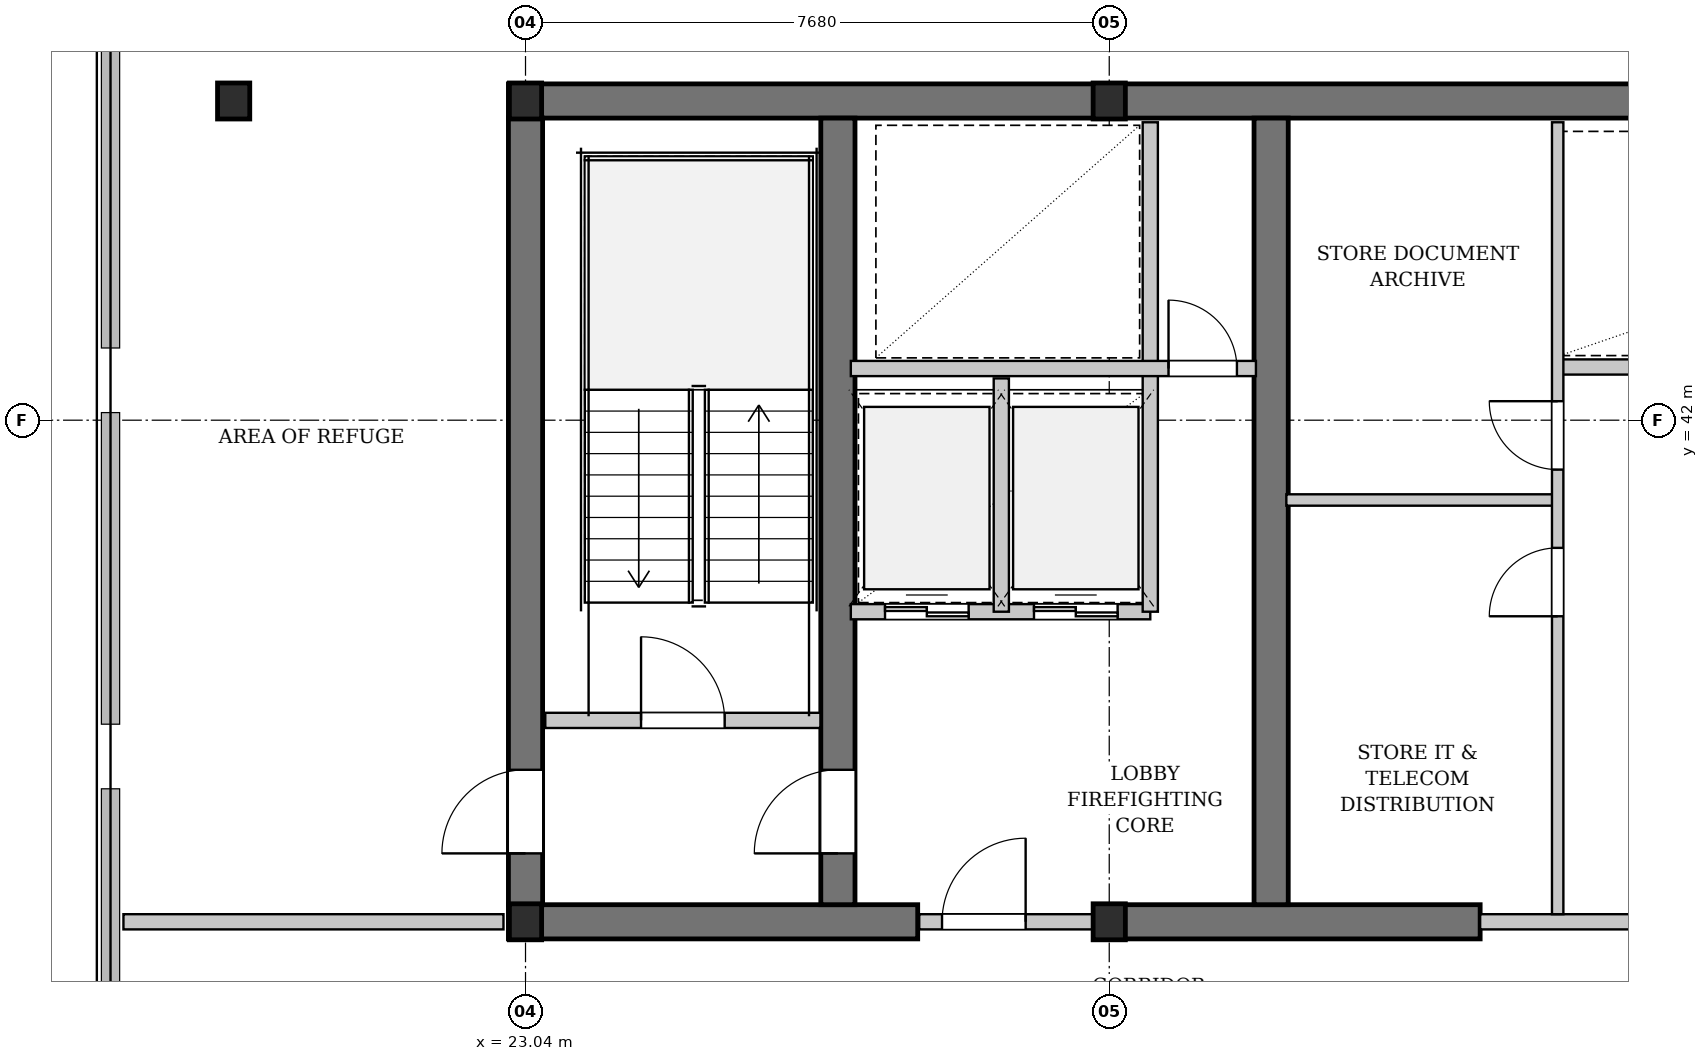
"""IFC4 building model, lengths in metres.
Left out: names, types, materials, properties, quantities, classifications, styles, units other than length and angle.
Written with IfcOpenShell. Run it as: python <this file> out.ifc"""

import sys

from ifc_helpers import new_model, si_unit, direction, frame, frame_2d, origin, origin_2d, place, context, subcontext, project, spatial, rectangle, i_section, extrude, element, fill, save


model = new_model("IFC4")
c1 = context("Model", 3, precision=1e-05, world=origin(), true_north=direction((0.0, 1.0)))
c2 = subcontext(c1, "Body", "Model", "MODEL_VIEW")
j1 = project(units=[si_unit("LENGTHUNIT", "METRE"), si_unit("PLANEANGLEUNIT", "RADIAN")], contexts=[c1])
p1 = place(None, origin())
s1 = spatial("IfcSite", under=j1, at=p1, CompositionType="ELEMENT")
p2 = place(p1, origin())
s2 = spatial("IfcBuilding", under=s1, at=p2, CompositionType="ELEMENT")
p3 = place(p2, frame((0.0, 0.0, 137.3)))
s3 = spatial("IfcBuildingStorey", under=s2, at=p3, CompositionType="ELEMENT", Elevation=137.3)
p4 = place(p3, frame((22.815, 46.2, 0.0), z_axis=(0.0, 0.0, 1.0), x_axis=(1.0, 0.0, 0.0)))
e1 = element("IfcWall", 1, at=p4, inside=s3, PredefinedType="SHEAR", context=c2, shape_type="SweptSolid", body=[
    extrude(rectangle(XDim=31.17, YDim=0.45, at=frame_2d((15.585, 0.0))), origin(), (0.0, 0.0, 1.0), 3.68),
])
p5 = place(p3, frame((22.815, 35.4, 0.0), z_axis=(0.0, 0.0, 1.0), x_axis=(1.0, 0.0, 0.0)))
e2 = element("IfcWall", 2, at=p5, inside=s3, PredefinedType="SHEAR", context=c2, shape_type="SweptSolid", body=[
    extrude(rectangle(XDim=5.385, YDim=0.45, at=frame_2d((2.692, 0.0))), origin(), (0.0, 0.0, 1.0), 3.68),
])
p6 = place(p3, frame((30.72, 35.4, 0.0), z_axis=(0.0, 0.0, 1.0), x_axis=(1.0, 0.0, 0.0)))
e3 = element("IfcWall", 3, at=p6, inside=s3, PredefinedType="SHEAR", context=c2, shape_type="SweptSolid", body=[
    extrude(rectangle(XDim=4.88, YDim=0.45, at=frame_2d((2.44, 0.0))), origin(), (0.0, 0.0, 1.0), 3.68),
])
p7 = place(p3, frame((23.04, 35.625, 0.0), z_axis=(0.0, 0.0, 1.0), x_axis=(0.0, 1.0, 0.0)))
e4 = element("IfcWall", 4, at=p7, inside=s3, PredefinedType="SHEAR", context=c2, shape_type="SweptSolid", body=[
    extrude(rectangle(XDim=10.35, YDim=0.45, at=frame_2d((5.175, 0.0))), origin(), (0.0, 0.0, 1.0), 3.68),
])
p8 = place(p7, frame((0.675, 0.0, 0.0)))
e5 = element("IfcOpeningElement", 5, at=p8, cuts=e4, PredefinedType="OPENING", context=c2, shape_type="SweptSolid", body=[
    extrude(rectangle(XDim=1.1, YDim=2.15, at=frame_2d((0.55, 1.075))), frame((0.0, 0.235, 0.0), z_axis=(0.0, -1.0, 0.0), x_axis=(1.0, 0.0, 0.0)), (0.0, 0.0, 1.0), 0.47),
])
p9 = place(p3, frame((27.15, 35.625, 0.0), z_axis=(0.0, 0.0, 1.0), x_axis=(0.0, 1.0, 0.0)))
e6 = element("IfcWall", 6, at=p9, inside=s3, PredefinedType="SHEAR", context=c2, shape_type="SweptSolid", body=[
    extrude(rectangle(XDim=10.35, YDim=0.45, at=frame_2d((5.175, 0.0))), origin(), (0.0, 0.0, 1.0), 3.68),
])
p10 = place(p9, frame((0.675, 0.0, 0.0)))
e7 = element("IfcOpeningElement", 7, at=p10, cuts=e6, PredefinedType="OPENING", context=c2, shape_type="SweptSolid", body=[
    extrude(rectangle(XDim=1.1, YDim=2.15, at=frame_2d((0.55, 1.075))), frame((0.0, 0.235, 0.0), z_axis=(0.0, -1.0, 0.0), x_axis=(1.0, 0.0, 0.0)), (0.0, 0.0, 1.0), 0.47),
])
p11 = place(p3, frame((32.85, 35.625, 0.0), z_axis=(0.0, 0.0, 1.0), x_axis=(0.0, 1.0, 0.0)))
e8 = element("IfcWall", 8, at=p11, inside=s3, PredefinedType="SHEAR", context=c2, shape_type="SweptSolid", body=[
    extrude(rectangle(XDim=10.35, YDim=0.45, at=frame_2d((5.175, 0.0))), origin(), (0.0, 0.0, 1.0), 3.68),
])
for number, where, z_axis, x_axis in (
    (9, (23.04, 35.4, 0.0), (0.0, 0.0, 1.0), (1.0, 0.0, 0.0)),
    (10, (23.04, 46.2, 0.0), (0.0, 0.0, 1.0), (1.0, 0.0, 0.0)),
    (11, (30.72, 35.4, 0.0), (0.0, 0.0, 1.0), (1.0, 0.0, 0.0)),
    (12, (30.72, 46.2, 0.0), (0.0, 0.0, 1.0), (1.0, 0.0, 0.0)),
    (13, (19.2, 46.2, 0.0), (0.0, 0.0, 1.0), (1.0, 0.0, 0.0)),
):
    element("IfcColumn", number, at=place(p3, frame(where, z_axis=z_axis, x_axis=x_axis)), inside=s3, PredefinedType="COLUMN", context=c2, shape_type="SweptSolid", body=[
        extrude(i_section(OverallWidth=0.424, OverallDepth=0.474, WebThickness=0.047, FlangeThickness=0.077, FilletRadius=0.015, at=origin_2d()), origin(), (0.0, 0.0, 1.0), 3.9),
    ])
p12 = place(p3, frame((23.3, 38.05, 0.0), z_axis=(0.0, 0.0, 1.0), x_axis=(1.0, 0.0, 0.0)))
e14 = element("IfcWall", 14, at=p12, inside=s3, PredefinedType="PARTITIONING", context=c2, shape_type="SweptSolid", body=[
    extrude(rectangle(XDim=3.62, YDim=0.2, at=frame_2d((1.81, 0.0))), origin(), (0.0, 0.0, 1.0), 3.68),
])
p13 = place(p12, frame((1.26, 0.0, 0.0)))
e15 = element("IfcOpeningElement", 15, at=p13, cuts=e14, PredefinedType="OPENING", context=c2, shape_type="SweptSolid", body=[
    extrude(rectangle(XDim=1.1, YDim=2.15, at=frame_2d((0.55, 1.075))), frame((0.0, 0.11, 0.0), z_axis=(0.0, -1.0, 0.0), x_axis=(1.0, 0.0, 0.0)), (0.0, 0.0, 1.0), 0.22),
])
p14 = place(p3, frame((28.22, 35.4, 0.0), z_axis=(0.0, 0.0, 1.0), x_axis=(1.0, 0.0, 0.0)))
e16 = element("IfcWall", 16, at=p14, inside=s3, PredefinedType="PARTITIONING", context=c2, shape_type="SweptSolid", body=[
    extrude(rectangle(XDim=2.5, YDim=0.2, at=frame_2d((1.25, 0.0))), origin(), (0.0, 0.0, 1.0), 2.765),
])
p15 = place(p14, frame((0.3, 0.0, 0.0)))
e17 = element("IfcOpeningElement", 17, at=p15, cuts=e16, PredefinedType="OPENING", context=c2, shape_type="SweptSolid", body=[
    extrude(rectangle(XDim=1.1, YDim=2.15, at=frame_2d((0.55, 1.075))), frame((0.0, 0.11, 0.0), z_axis=(0.0, -1.0, 0.0), x_axis=(1.0, 0.0, 0.0)), (0.0, 0.0, 1.0), 0.22),
])
p16 = place(p3, frame((27.32, 39.48, 0.0), z_axis=(0.0, 0.0, 1.0), x_axis=(1.0, 0.0, 0.0)))
e18 = element("IfcWall", 18, at=p16, inside=s3, PredefinedType="PARTITIONING", context=c2, shape_type="SweptSolid", body=[
    extrude(rectangle(XDim=3.94, YDim=0.2, at=frame_2d((1.97, 0.0))), origin(), (0.0, 0.0, 1.0), 3.68),
])
p17 = place(p16, frame((0.45, 0.0, 0.0)))
e19 = element("IfcOpeningElement", 19, at=p17, cuts=e18, PredefinedType="OPENING", context=c2, shape_type="SweptSolid", body=[
    extrude(rectangle(XDim=1.1, YDim=2.2, at=frame_2d((0.55, 1.1))), frame((0.0, 0.11, 0.0), z_axis=(0.0, -1.0, 0.0), x_axis=(1.0, 0.0, 0.0)), (0.0, 0.0, 1.0), 0.22),
])
p18 = place(p16, frame((2.41, 0.0, 0.0)))
e20 = element("IfcOpeningElement", 20, at=p18, cuts=e18, PredefinedType="OPENING", context=c2, shape_type="SweptSolid", body=[
    extrude(rectangle(XDim=1.1, YDim=2.2, at=frame_2d((0.55, 1.1))), frame((0.0, 0.11, 0.0), z_axis=(0.0, -1.0, 0.0), x_axis=(1.0, 0.0, 0.0)), (0.0, 0.0, 1.0), 0.22),
])
p19 = place(p3, frame((29.3, 39.48, 0.0), z_axis=(0.0, 0.0, 1.0), x_axis=(0.0, 1.0, 0.0)))
e21 = element("IfcWall", 21, at=p19, inside=s3, PredefinedType="PARTITIONING", context=c2, shape_type="SweptSolid", body=[
    extrude(rectangle(XDim=3.07, YDim=0.2, at=frame_2d((1.535, 0.0))), origin(), (0.0, 0.0, 1.0), 3.68),
])
p20 = place(p3, frame((31.26, 39.48, 0.0), z_axis=(0.0, 0.0, 1.0), x_axis=(0.0, 1.0, 0.0)))
e22 = element("IfcWall", 22, at=p20, inside=s3, PredefinedType="PARTITIONING", context=c2, shape_type="SweptSolid", body=[
    extrude(rectangle(XDim=6.44, YDim=0.2, at=frame_2d((3.22, 0.0))), origin(), (0.0, 0.0, 1.0), 3.68),
])
p21 = place(p3, frame((27.32, 42.68, 0.0), z_axis=(0.0, 0.0, 1.0), x_axis=(1.0, 0.0, 0.0)))
e23 = element("IfcWall", 23, at=p21, inside=s3, PredefinedType="PARTITIONING", context=c2, shape_type="SweptSolid", body=[
    extrude(rectangle(XDim=5.33, YDim=0.2, at=frame_2d((2.665, 0.0))), origin(), (0.0, 0.0, 1.0), 3.68),
])
p22 = place(p21, frame((4.18, 0.0, 0.0)))
e24 = element("IfcOpeningElement", 24, at=p22, cuts=e23, PredefinedType="OPENING", context=c2, shape_type="SweptSolid", body=[
    extrude(rectangle(XDim=0.9, YDim=2.15, at=frame_2d((0.45, 1.075))), frame((0.0, 0.11, 0.0), z_axis=(0.0, -1.0, 0.0), x_axis=(1.0, 0.0, 0.0)), (0.0, 0.0, 1.0), 0.22),
])
p23 = place(p3, frame((35.6, 35.4, 0.0), z_axis=(0.0, 0.0, 1.0), x_axis=(1.0, 0.0, 0.0)))
e25 = element("IfcWall", 25, at=p23, inside=s3, PredefinedType="PARTITIONING", context=c2, shape_type="SweptSolid", body=[
    extrude(rectangle(XDim=6.5, YDim=0.2, at=frame_2d((3.25, 0.0))), origin(), (0.0, 0.0, 1.0), 2.765),
])
p24 = place(p23, frame((3.8, 0.0, 0.0)))
e26 = element("IfcOpeningElement", 26, at=p24, cuts=e25, PredefinedType="OPENING", context=c2, shape_type="SweptSolid", body=[
    extrude(rectangle(XDim=1.8, YDim=2.3, at=frame_2d((0.9, 1.15))), frame((0.0, 0.11, 0.0), z_axis=(0.0, -1.0, 0.0), x_axis=(1.0, 0.0, 0.0)), (0.0, 0.0, 1.0), 0.22),
])
p25 = place(p3, frame((36.6, 42.7, 0.0), z_axis=(0.0, 0.0, 1.0), x_axis=(1.0, 0.0, 0.0)))
e27 = element("IfcWall", 27, at=p25, inside=s3, PredefinedType="PARTITIONING", context=c2, shape_type="SweptSolid", body=[
    extrude(rectangle(XDim=5.25, YDim=0.2, at=frame_2d((2.625, 0.0))), origin(), (0.0, 0.0, 1.0), 3.68),
])
p26 = place(p3, frame((33.05, 40.95, 0.0), z_axis=(0.0, 0.0, 1.0), x_axis=(1.0, 0.0, 0.0)))
e28 = element("IfcWall", 28, at=p26, inside=s3, PredefinedType="PARTITIONING", context=c2, shape_type="SweptSolid", body=[
    extrude(rectangle(XDim=3.57, YDim=0.15, at=frame_2d((1.785, 0.0))), origin(), (0.0, 0.0, 1.0), 3.68),
])
p27 = place(p3, frame((36.62, 35.5, 0.0), z_axis=(0.0, 0.0, 1.0), x_axis=(0.0, 1.0, 0.0)))
e29 = element("IfcWall", 29, at=p27, inside=s3, PredefinedType="PARTITIONING", context=c2, shape_type="SweptSolid", body=[
    extrude(rectangle(XDim=10.42, YDim=0.15, at=frame_2d((5.21, 0.0))), origin(), (0.0, 0.0, 1.0), 3.68),
])
p28 = place(p27, frame((3.92, 0.0, 0.0)))
e30 = element("IfcOpeningElement", 30, at=p28, cuts=e29, PredefinedType="OPENING", context=c2, shape_type="SweptSolid", body=[
    extrude(rectangle(XDim=0.9, YDim=2.15, at=frame_2d((0.45, 1.075))), frame((0.0, 0.085, 0.0), z_axis=(0.0, -1.0, 0.0), x_axis=(1.0, 0.0, 0.0)), (0.0, 0.0, 1.0), 0.17),
])
p29 = place(p27, frame((5.85, 0.0, 0.0)))
e31 = element("IfcOpeningElement", 31, at=p29, cuts=e29, PredefinedType="OPENING", context=c2, shape_type="SweptSolid", body=[
    extrude(rectangle(XDim=0.9, YDim=2.15, at=frame_2d((0.45, 1.075))), frame((0.0, 0.085, 0.0), z_axis=(0.0, -1.0, 0.0), x_axis=(1.0, 0.0, 0.0)), (0.0, 0.0, 1.0), 0.17),
])
p30 = place(p3, frame((17.75, 35.4, 0.0), z_axis=(0.0, 0.0, 1.0), x_axis=(1.0, 0.0, 0.0)))
e32 = element("IfcWall", 32, at=p30, inside=s3, PredefinedType="PARTITIONING", context=c2, shape_type="SweptSolid", body=[
    extrude(rectangle(XDim=5.0, YDim=0.2, at=frame_2d((2.5, 0.0))), origin(), (0.0, 0.0, 1.0), 3.68),
])
p31 = place(p13, origin())
e33 = element("IfcDoor", 33, at=p31, inside=s3, OperationType="SINGLE_SWING_LEFT", PredefinedType="DOOR", context=c2, shape_type="SweptSolid", body=[
    extrude(rectangle(XDim=1.1, YDim=2.15, at=frame_2d((0.55, 1.075))), frame((0.0, 0.025, 0.0), z_axis=(0.0, -1.0, 0.0), x_axis=(1.0, 0.0, 0.0)), (0.0, 0.0, 1.0), 0.05),
])
fill(e15, e33)
p32 = place(p15, origin())
e34 = element("IfcDoor", 34, at=p32, inside=s3, OperationType="SINGLE_SWING_RIGHT", PredefinedType="DOOR", context=c2, shape_type="SweptSolid", body=[
    extrude(rectangle(XDim=1.1, YDim=2.15, at=frame_2d((0.55, 1.075))), frame((0.0, 0.025, 0.0), z_axis=(0.0, -1.0, 0.0), x_axis=(1.0, 0.0, 0.0)), (0.0, 0.0, 1.0), 0.05),
])
fill(e17, e34)
p33 = place(p17, origin())
e35 = element("IfcDoor", 35, at=p33, inside=s3, OperationType="DOUBLE_DOOR_SLIDING", PredefinedType="DOOR", context=c2, shape_type="SweptSolid", body=[
    extrude(rectangle(XDim=1.1, YDim=2.2, at=frame_2d((0.55, 1.1))), frame((0.0, 0.025, 0.0), z_axis=(0.0, -1.0, 0.0), x_axis=(1.0, 0.0, 0.0)), (0.0, 0.0, 1.0), 0.05),
])
fill(e19, e35)
p34 = place(p18, origin())
e36 = element("IfcDoor", 36, at=p34, inside=s3, OperationType="DOUBLE_DOOR_SLIDING", PredefinedType="DOOR", context=c2, shape_type="SweptSolid", body=[
    extrude(rectangle(XDim=1.1, YDim=2.2, at=frame_2d((0.55, 1.1))), frame((0.0, 0.025, 0.0), z_axis=(0.0, -1.0, 0.0), x_axis=(1.0, 0.0, 0.0)), (0.0, 0.0, 1.0), 0.05),
])
fill(e20, e36)
p35 = place(p22, origin())
e37 = element("IfcDoor", 37, at=p35, inside=s3, OperationType="SINGLE_SWING_LEFT", PredefinedType="DOOR", context=c2, shape_type="SweptSolid", body=[
    extrude(rectangle(XDim=0.9, YDim=2.15, at=frame_2d((0.45, 1.075))), frame((0.0, 0.025, 0.0), z_axis=(0.0, -1.0, 0.0), x_axis=(1.0, 0.0, 0.0)), (0.0, 0.0, 1.0), 0.05),
])
fill(e24, e37)
p36 = place(p28, origin())
e38 = element("IfcDoor", 38, at=p36, inside=s3, OperationType="SINGLE_SWING_LEFT", PredefinedType="DOOR", context=c2, shape_type="SweptSolid", body=[
    extrude(rectangle(XDim=0.9, YDim=2.15, at=frame_2d((0.45, 1.075))), frame((0.0, 0.025, 0.0), z_axis=(0.0, -1.0, 0.0), x_axis=(1.0, 0.0, 0.0)), (0.0, 0.0, 1.0), 0.05),
])
fill(e30, e38)
p37 = place(p29, origin())
e39 = element("IfcDoor", 39, at=p37, inside=s3, OperationType="SINGLE_SWING_RIGHT", PredefinedType="DOOR", context=c2, shape_type="SweptSolid", body=[
    extrude(rectangle(XDim=0.9, YDim=2.15, at=frame_2d((0.45, 1.075))), frame((0.0, 0.025, 0.0), z_axis=(0.0, -1.0, 0.0), x_axis=(1.0, 0.0, 0.0)), (0.0, 0.0, 1.0), 0.05),
])
fill(e31, e39)
p38 = place(p10, origin())
e40 = element("IfcDoor", 40, at=p38, inside=s3, OperationType="SINGLE_SWING_LEFT", PredefinedType="DOOR", context=c2, shape_type="SweptSolid", body=[
    extrude(rectangle(XDim=1.1, YDim=2.15, at=frame_2d((0.55, 1.075))), frame((0.0, 0.025, 0.0), z_axis=(0.0, -1.0, 0.0), x_axis=(1.0, 0.0, 0.0)), (0.0, 0.0, 1.0), 0.05),
])
fill(e7, e40)
p39 = place(p8, origin())
e41 = element("IfcDoor", 41, at=p39, inside=s3, OperationType="SINGLE_SWING_LEFT", PredefinedType="DOOR", context=c2, shape_type="SweptSolid", body=[
    extrude(rectangle(XDim=1.1, YDim=2.15, at=frame_2d((0.55, 1.075))), frame((0.0, 0.025, 0.0), z_axis=(0.0, -1.0, 0.0), x_axis=(1.0, 0.0, 0.0)), (0.0, 0.0, 1.0), 0.05),
])
fill(e5, e41)
save(model, sys.argv[1])
